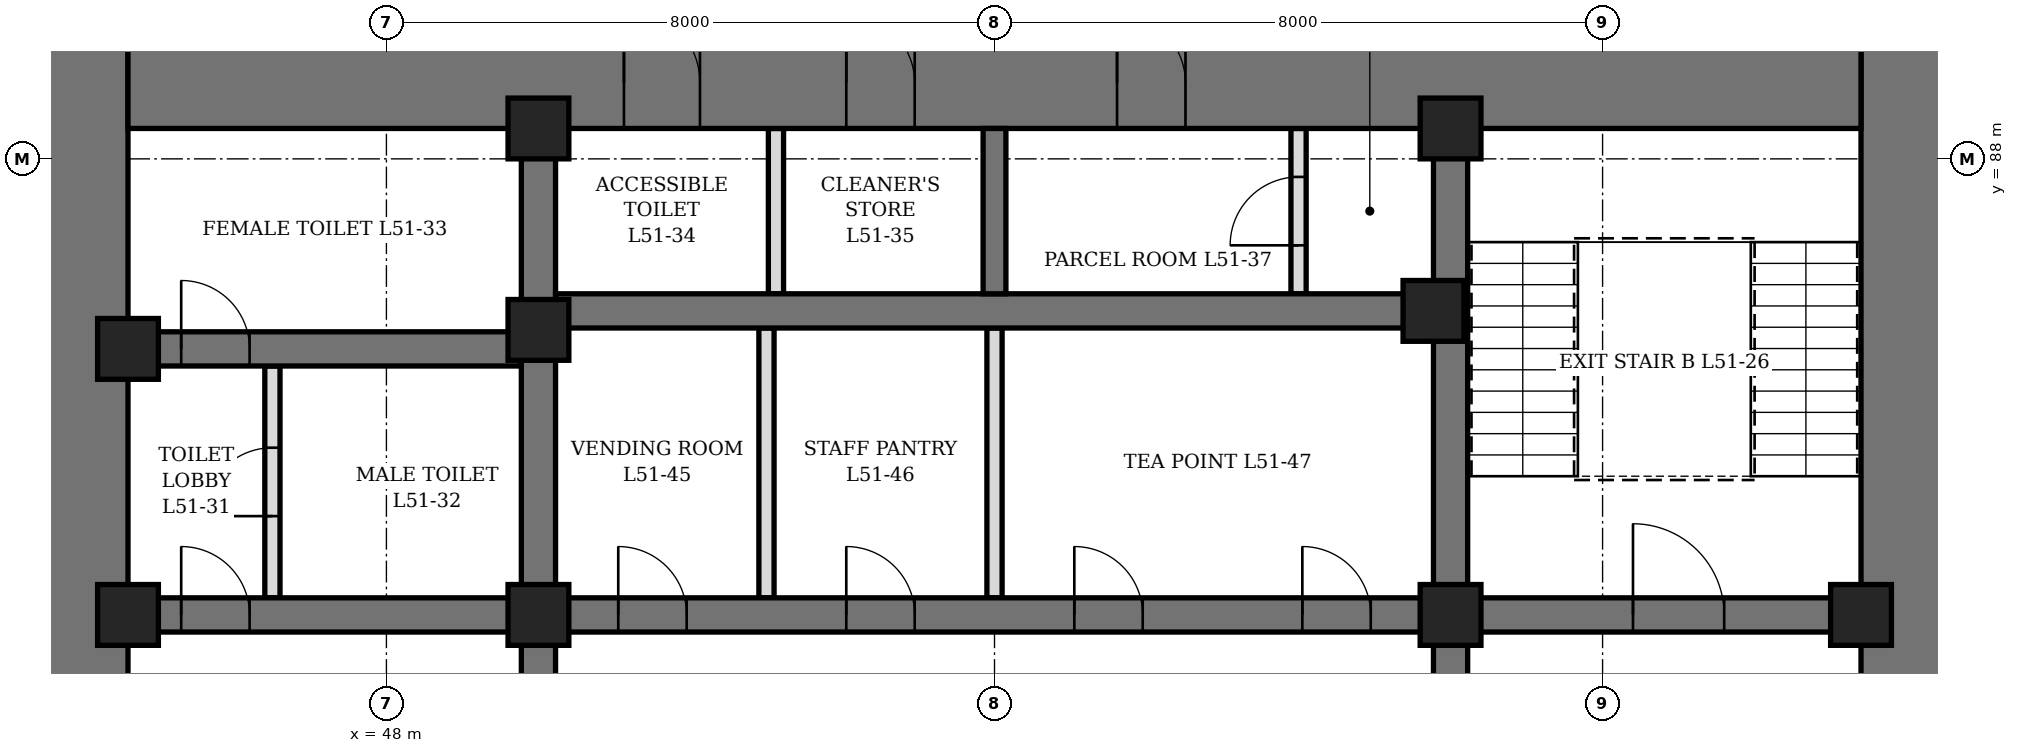
"""IFC4 building model, lengths in metres.
Left out: names, types, materials, properties, quantities, classifications, styles, units other than length and angle.
Written with IfcOpenShell. Run it as: python <this file> out.ifc"""

import sys

from ifc_helpers import new_model, si_unit, direction, frame, frame_2d, origin, origin_2d, place, context, subcontext, project, spatial, rectangle, hollow_rectangle, extrude, element, fill, save


model = new_model("IFC4")
c1 = context("Model", 3, precision=1e-05, world=origin(), true_north=direction((0.0, 1.0)))
c2 = subcontext(c1, "Body", "Model", "MODEL_VIEW")
j1 = project(units=[si_unit("LENGTHUNIT", "METRE"), si_unit("PLANEANGLEUNIT", "RADIAN")], contexts=[c1])
p1 = place(None, origin())
s1 = spatial("IfcSite", under=j1, at=p1, CompositionType="ELEMENT")
p2 = place(p1, origin())
s2 = spatial("IfcBuilding", under=s1, at=p2, CompositionType="ELEMENT")
p3 = place(p2, frame((0.0, 0.0, 227.5)))
s3 = spatial("IfcBuildingStorey", under=s2, at=p3, CompositionType="ELEMENT", Elevation=227.5)
p4 = place(p3, frame((44.0, 70.4, 0.0), z_axis=(0.0, 0.0, 1.0), x_axis=(0.0, 1.0, 0.0)))
e1 = element("IfcWall", 1, at=p4, inside=s3, PredefinedType="SHEAR", context=c2, shape_type="SweptSolid", body=[
    extrude(rectangle(XDim=19.2, YDim=1.2, at=frame_2d((9.6, 0.0))), origin(), (0.0, 0.0, 1.0), 4.2),
])
p5 = place(p4, frame((8.6, 0.0, 0.0)))
e2 = element("IfcOpeningElement", 2, at=p5, cuts=e1, PredefinedType="OPENING", context=c2, shape_type="SweptSolid", body=[
    extrude(rectangle(XDim=2.0, YDim=2.4, at=frame_2d((1.0, 1.2))), frame((0.0, 0.61, 0.0), z_axis=(0.0, -1.0, 0.0), x_axis=(1.0, 0.0, 0.0)), (0.0, 0.0, 1.0), 1.22),
])
p6 = place(p3, frame((68.0, 70.4, 0.0), z_axis=(0.0, 0.0, 1.0), x_axis=(0.0, 1.0, 0.0)))
e3 = element("IfcWall", 3, at=p6, inside=s3, PredefinedType="SHEAR", context=c2, shape_type="SweptSolid", body=[
    extrude(rectangle(XDim=19.2, YDim=1.2, at=frame_2d((9.6, 0.0))), origin(), (0.0, 0.0, 1.0), 4.2),
])
p7 = place(p6, frame((8.6, 0.0, 0.0)))
e4 = element("IfcOpeningElement", 4, at=p7, cuts=e3, PredefinedType="OPENING", context=c2, shape_type="SweptSolid", body=[
    extrude(rectangle(XDim=2.0, YDim=2.4, at=frame_2d((1.0, 1.2))), frame((0.0, 0.61, 0.0), z_axis=(0.0, -1.0, 0.0), x_axis=(1.0, 0.0, 0.0)), (0.0, 0.0, 1.0), 1.22),
])
p8 = place(p3, frame((44.6, 89.0, 0.0), z_axis=(0.0, 0.0, 1.0), x_axis=(1.0, 0.0, 0.0)))
e5 = element("IfcWall", 5, at=p8, inside=s3, PredefinedType="SHEAR", context=c2, shape_type="SweptSolid", body=[
    extrude(rectangle(XDim=22.8, YDim=1.2, at=frame_2d((11.4, 0.0))), origin(), (0.0, 0.0, 1.0), 4.2),
])
p9 = place(p8, frame((6.525, 0.0, 0.0)))
e6 = element("IfcOpeningElement", 6, at=p9, cuts=e5, PredefinedType="OPENING", context=c2, shape_type="SweptSolid", body=[
    extrude(rectangle(XDim=1.0, YDim=2.1, at=frame_2d((0.5, 1.05))), frame((0.0, 0.61, 0.0), z_axis=(0.0, -1.0, 0.0), x_axis=(1.0, 0.0, 0.0)), (0.0, 0.0, 1.0), 1.22),
])
p10 = place(p8, frame((9.45, 0.0, 0.0)))
e7 = element("IfcOpeningElement", 7, at=p10, cuts=e5, PredefinedType="OPENING", context=c2, shape_type="SweptSolid", body=[
    extrude(rectangle(XDim=0.9, YDim=2.1, at=frame_2d((0.45, 1.05))), frame((0.0, 0.61, 0.0), z_axis=(0.0, -1.0, 0.0), x_axis=(1.0, 0.0, 0.0)), (0.0, 0.0, 1.0), 1.22),
])
p11 = place(p8, frame((13.012, 0.0, 0.0)))
e8 = element("IfcOpeningElement", 8, at=p11, cuts=e5, PredefinedType="OPENING", context=c2, shape_type="SweptSolid", body=[
    extrude(rectangle(XDim=0.9, YDim=2.1, at=frame_2d((0.45, 1.05))), frame((0.0, 0.61, 0.0), z_axis=(0.0, -1.0, 0.0), x_axis=(1.0, 0.0, 0.0)), (0.0, 0.0, 1.0), 1.22),
])
p12 = place(p3, frame((50.0, 71.6, 0.0), z_axis=(0.0, 0.0, 1.0), x_axis=(0.0, 1.0, 0.0)))
e9 = element("IfcWall", 9, at=p12, inside=s3, PredefinedType="SHEAR", context=c2, shape_type="SweptSolid", body=[
    extrude(rectangle(XDim=16.8, YDim=0.45, at=frame_2d((8.4, 0.0))), origin(), (0.0, 0.0, 1.0), 4.2),
])
p13 = place(p12, frame((7.5, 0.0, 0.0)))
e10 = element("IfcOpeningElement", 10, at=p13, cuts=e9, PredefinedType="OPENING", context=c2, shape_type="SweptSolid", body=[
    extrude(rectangle(XDim=1.8, YDim=2.4, at=frame_2d((0.9, 1.2))), frame((0.0, 0.235, 0.0), z_axis=(0.0, -1.0, 0.0), x_axis=(1.0, 0.0, 0.0)), (0.0, 0.0, 1.0), 0.47),
])
p14 = place(p3, frame((62.0, 71.6, 0.0), z_axis=(0.0, 0.0, 1.0), x_axis=(0.0, 1.0, 0.0)))
e11 = element("IfcWall", 11, at=p14, inside=s3, PredefinedType="SHEAR", context=c2, shape_type="SweptSolid", body=[
    extrude(rectangle(XDim=16.8, YDim=0.45, at=frame_2d((8.4, 0.0))), origin(), (0.0, 0.0, 1.0), 4.2),
])
p15 = place(p14, frame((7.5, 0.0, 0.0)))
e12 = element("IfcOpeningElement", 12, at=p15, cuts=e11, PredefinedType="OPENING", context=c2, shape_type="SweptSolid", body=[
    extrude(rectangle(XDim=1.8, YDim=2.4, at=frame_2d((0.9, 1.2))), frame((0.0, 0.235, 0.0), z_axis=(0.0, -1.0, 0.0), x_axis=(1.0, 0.0, 0.0)), (0.0, 0.0, 1.0), 0.47),
])
p16 = place(p3, frame((44.6, 82.0, 0.0), z_axis=(0.0, 0.0, 1.0), x_axis=(1.0, 0.0, 0.0)))
e13 = element("IfcWall", 13, at=p16, inside=s3, PredefinedType="SHEAR", context=c2, shape_type="SweptSolid", body=[
    extrude(rectangle(XDim=5.175, YDim=0.45, at=frame_2d((2.587, 0.0))), origin(), (0.0, 0.0, 1.0), 4.2),
])
p17 = place(p16, frame((0.7, 0.0, 0.0)))
e14 = element("IfcOpeningElement", 14, at=p17, cuts=e13, PredefinedType="OPENING", context=c2, shape_type="SweptSolid", body=[
    extrude(rectangle(XDim=0.9, YDim=2.1, at=frame_2d((0.45, 1.05))), frame((0.0, 0.235, 0.0), z_axis=(0.0, -1.0, 0.0), x_axis=(1.0, 0.0, 0.0)), (0.0, 0.0, 1.0), 0.47),
])
p18 = place(p3, frame((44.6, 85.5, 0.0), z_axis=(0.0, 0.0, 1.0), x_axis=(1.0, 0.0, 0.0)))
e15 = element("IfcWall", 15, at=p18, inside=s3, PredefinedType="SHEAR", context=c2, shape_type="SweptSolid", body=[
    extrude(rectangle(XDim=5.175, YDim=0.45, at=frame_2d((2.587, 0.0))), origin(), (0.0, 0.0, 1.0), 4.2),
])
p19 = place(p18, frame((0.7, 0.0, 0.0)))
e16 = element("IfcOpeningElement", 16, at=p19, cuts=e15, PredefinedType="OPENING", context=c2, shape_type="SweptSolid", body=[
    extrude(rectangle(XDim=0.9, YDim=2.1, at=frame_2d((0.45, 1.05))), frame((0.0, 0.235, 0.0), z_axis=(0.0, -1.0, 0.0), x_axis=(1.0, 0.0, 0.0)), (0.0, 0.0, 1.0), 0.47),
])
p20 = place(p3, frame((62.225, 82.0, 0.0), z_axis=(0.0, 0.0, 1.0), x_axis=(1.0, 0.0, 0.0)))
e17 = element("IfcWall", 17, at=p20, inside=s3, PredefinedType="SHEAR", context=c2, shape_type="SweptSolid", body=[
    extrude(rectangle(XDim=5.175, YDim=0.45, at=frame_2d((2.587, 0.0))), origin(), (0.0, 0.0, 1.0), 4.2),
])
p21 = place(p20, frame((2.175, 0.0, 0.0)))
e18 = element("IfcOpeningElement", 18, at=p21, cuts=e17, PredefinedType="OPENING", context=c2, shape_type="SweptSolid", body=[
    extrude(rectangle(XDim=1.2, YDim=2.1, at=frame_2d((0.6, 1.05))), frame((0.0, 0.235, 0.0), z_axis=(0.0, -1.0, 0.0), x_axis=(1.0, 0.0, 0.0)), (0.0, 0.0, 1.0), 0.47),
])
p22 = place(p3, frame((50.225, 82.0, 0.0), z_axis=(0.0, 0.0, 1.0), x_axis=(1.0, 0.0, 0.0)))
e19 = element("IfcWall", 19, at=p22, inside=s3, PredefinedType="SHEAR", context=c2, shape_type="SweptSolid", body=[
    extrude(rectangle(XDim=11.55, YDim=0.45, at=frame_2d((5.775, 0.0))), origin(), (0.0, 0.0, 1.0), 4.2),
])
p23 = place(p22, frame((0.825, 0.0, 0.0)))
e20 = element("IfcOpeningElement", 20, at=p23, cuts=e19, PredefinedType="OPENING", context=c2, shape_type="SweptSolid", body=[
    extrude(rectangle(XDim=0.9, YDim=2.1, at=frame_2d((0.45, 1.05))), frame((0.0, 0.235, 0.0), z_axis=(0.0, -1.0, 0.0), x_axis=(1.0, 0.0, 0.0)), (0.0, 0.0, 1.0), 0.47),
])
p24 = place(p22, frame((3.825, 0.0, 0.0)))
e21 = element("IfcOpeningElement", 21, at=p24, cuts=e19, PredefinedType="OPENING", context=c2, shape_type="SweptSolid", body=[
    extrude(rectangle(XDim=0.9, YDim=2.1, at=frame_2d((0.45, 1.05))), frame((0.0, 0.235, 0.0), z_axis=(0.0, -1.0, 0.0), x_axis=(1.0, 0.0, 0.0)), (0.0, 0.0, 1.0), 0.47),
])
p25 = place(p22, frame((6.825, 0.0, 0.0)))
e22 = element("IfcOpeningElement", 22, at=p25, cuts=e19, PredefinedType="OPENING", context=c2, shape_type="SweptSolid", body=[
    extrude(rectangle(XDim=0.9, YDim=2.1, at=frame_2d((0.45, 1.05))), frame((0.0, 0.235, 0.0), z_axis=(0.0, -1.0, 0.0), x_axis=(1.0, 0.0, 0.0)), (0.0, 0.0, 1.0), 0.47),
])
p26 = place(p22, frame((9.825, 0.0, 0.0)))
e23 = element("IfcOpeningElement", 23, at=p26, cuts=e19, PredefinedType="OPENING", context=c2, shape_type="SweptSolid", body=[
    extrude(rectangle(XDim=0.9, YDim=2.1, at=frame_2d((0.45, 1.05))), frame((0.0, 0.235, 0.0), z_axis=(0.0, -1.0, 0.0), x_axis=(1.0, 0.0, 0.0)), (0.0, 0.0, 1.0), 0.47),
])
p27 = place(p3, frame((50.225, 86.0, 0.0), z_axis=(0.0, 0.0, 1.0), x_axis=(1.0, 0.0, 0.0)))
e24 = element("IfcWall", 24, at=p27, inside=s3, PredefinedType="SHEAR", context=c2, shape_type="SweptSolid", body=[
    extrude(rectangle(XDim=11.55, YDim=0.45, at=frame_2d((5.775, 0.0))), origin(), (0.0, 0.0, 1.0), 4.2),
])
p28 = place(p3, frame((56.0, 86.225, 0.0), z_axis=(0.0, 0.0, 1.0), x_axis=(0.0, 1.0, 0.0)))
e25 = element("IfcWall", 25, at=p28, inside=s3, PredefinedType="SHEAR", context=c2, shape_type="SweptSolid", body=[
    extrude(rectangle(XDim=2.175, YDim=0.3, at=frame_2d((1.087, 0.0))), origin(), (0.0, 0.0, 1.0), 4.2),
])
for number, where, z_axis, x_axis in (
    (26, (44.6, 82.0, 0.0), (0.0, 0.0, 1.0), (1.0, 0.0, 0.0)),
    (27, (44.6, 85.5, 0.0), (0.0, 0.0, 1.0), (1.0, 0.0, 0.0)),
    (28, (50.0, 82.0, 0.0), (0.0, 0.0, 1.0), (1.0, 0.0, 0.0)),
    (29, (50.0, 85.75, 0.0), (0.0, 0.0, 1.0), (1.0, 0.0, 0.0)),
    (30, (50.0, 88.4, 0.0), (0.0, 0.0, 1.0), (1.0, 0.0, 0.0)),
    (31, (61.775, 86.0, 0.0), (0.0, 0.0, 1.0), (1.0, 0.0, 0.0)),
    (32, (62.0, 82.0, 0.0), (0.0, 0.0, 1.0), (1.0, 0.0, 0.0)),
    (33, (62.0, 88.4, 0.0), (0.0, 0.0, 1.0), (1.0, 0.0, 0.0)),
    (34, (67.4, 82.0, 0.0), (0.0, 0.0, 1.0), (1.0, 0.0, 0.0)),
):
    element("IfcColumn", number, at=place(p3, frame(where, z_axis=z_axis, x_axis=x_axis)), inside=s3, PredefinedType="COLUMN", context=c2, shape_type="SweptSolid", body=[
        extrude(hollow_rectangle(XDim=0.8, YDim=0.8, WallThickness=0.1, at=origin_2d()), origin(), (0.0, 0.0, 1.0), 4.2),
    ])
p29 = place(p3, frame((46.5, 82.225, 0.0), z_axis=(0.0, 0.0, 1.0), x_axis=(0.0, 1.0, 0.0)))
e35 = element("IfcWall", 35, at=p29, inside=s3, PredefinedType="PARTITIONING", context=c2, shape_type="SweptSolid", body=[
    extrude(rectangle(XDim=3.05, YDim=0.2, at=frame_2d((1.525, 0.0))), origin(), (0.0, 0.0, 1.0), 4.04),
])
p30 = place(p29, frame((1.075, 0.0, 0.0)))
e36 = element("IfcOpeningElement", 36, at=p30, cuts=e35, PredefinedType="OPENING", context=c2, shape_type="SweptSolid", body=[
    extrude(rectangle(XDim=0.9, YDim=2.1, at=frame_2d((0.45, 1.05))), frame((0.0, 0.11, 0.0), z_axis=(0.0, -1.0, 0.0), x_axis=(1.0, 0.0, 0.0)), (0.0, 0.0, 1.0), 0.22),
])
p31 = place(p3, frame((53.125, 86.225, 0.0), z_axis=(0.0, 0.0, 1.0), x_axis=(0.0, 1.0, 0.0)))
e37 = element("IfcWall", 37, at=p31, inside=s3, PredefinedType="PARTITIONING", context=c2, shape_type="SweptSolid", body=[
    extrude(rectangle(XDim=2.175, YDim=0.2, at=frame_2d((1.087, 0.0))), origin(), (0.0, 0.0, 1.0), 4.04),
])
p32 = place(p3, frame((60.0, 86.225, 0.0), z_axis=(0.0, 0.0, 1.0), x_axis=(0.0, 1.0, 0.0)))
e38 = element("IfcWall", 38, at=p32, inside=s3, PredefinedType="PARTITIONING", context=c2, shape_type="SweptSolid", body=[
    extrude(rectangle(XDim=2.175, YDim=0.2, at=frame_2d((1.087, 0.0))), origin(), (0.0, 0.0, 1.0), 4.04),
])
p33 = place(p32, frame((0.637, 0.0, 0.0)))
e39 = element("IfcOpeningElement", 39, at=p33, cuts=e38, PredefinedType="OPENING", context=c2, shape_type="SweptSolid", body=[
    extrude(rectangle(XDim=0.9, YDim=2.1, at=frame_2d((0.45, 1.05))), frame((0.0, 0.11, 0.0), z_axis=(0.0, -1.0, 0.0), x_axis=(1.0, 0.0, 0.0)), (0.0, 0.0, 1.0), 0.22),
])
p34 = place(p3, frame((53.0, 82.225, 0.0), z_axis=(0.0, 0.0, 1.0), x_axis=(0.0, 1.0, 0.0)))
e40 = element("IfcWall", 40, at=p34, inside=s3, PredefinedType="PARTITIONING", context=c2, shape_type="SweptSolid", body=[
    extrude(rectangle(XDim=3.55, YDim=0.2, at=frame_2d((1.775, 0.0))), origin(), (0.0, 0.0, 1.0), 4.04),
])
p35 = place(p3, frame((56.0, 82.225, 0.0), z_axis=(0.0, 0.0, 1.0), x_axis=(0.0, 1.0, 0.0)))
e41 = element("IfcWall", 41, at=p35, inside=s3, PredefinedType="PARTITIONING", context=c2, shape_type="SweptSolid", body=[
    extrude(rectangle(XDim=3.55, YDim=0.2, at=frame_2d((1.775, 0.0))), origin(), (0.0, 0.0, 1.0), 3.14),
])
p36 = place(p17, origin())
e42 = element("IfcDoor", 42, at=p36, inside=s3, OperationType="SINGLE_SWING_LEFT", PredefinedType="DOOR", context=c2, shape_type="SweptSolid", body=[
    extrude(rectangle(XDim=0.9, YDim=2.1, at=frame_2d((0.45, 1.05))), frame((0.0, 0.225, 0.0), z_axis=(0.0, -1.0, 0.0), x_axis=(1.0, 0.0, 0.0)), (0.0, 0.0, 1.0), 0.449),
])
fill(e14, e42)
p37 = place(p30, origin())
e43 = element("IfcDoor", 43, at=p37, inside=s3, OperationType="SINGLE_SWING_RIGHT", PredefinedType="DOOR", context=c2, shape_type="SweptSolid", body=[
    extrude(rectangle(XDim=0.9, YDim=2.1, at=frame_2d((0.45, 1.05))), frame((0.0, 0.1, 0.0), z_axis=(0.0, -1.0, 0.0), x_axis=(1.0, 0.0, 0.0)), (0.0, 0.0, 1.0), 0.199),
])
fill(e36, e43)
p38 = place(p19, origin())
e44 = element("IfcDoor", 44, at=p38, inside=s3, OperationType="SINGLE_SWING_RIGHT", PredefinedType="DOOR", context=c2, shape_type="SweptSolid", body=[
    extrude(rectangle(XDim=0.9, YDim=2.1, at=frame_2d((0.45, 1.05))), frame((0.0, 0.225, 0.0), z_axis=(0.0, -1.0, 0.0), x_axis=(1.0, 0.0, 0.0)), (0.0, 0.0, 1.0), 0.449),
])
fill(e16, e44)
p39 = place(p9, origin())
e45 = element("IfcDoor", 45, at=p39, inside=s3, OperationType="SINGLE_SWING_LEFT", PredefinedType="DOOR", context=c2, shape_type="SweptSolid", body=[
    extrude(rectangle(XDim=1.0, YDim=2.1, at=frame_2d((0.5, 1.05))), frame((0.0, 0.35, 0.0), z_axis=(0.0, -1.0, 0.0), x_axis=(1.0, 0.0, 0.0)), (0.0, 0.0, 1.0), 0.7),
])
fill(e6, e45)
p40 = place(p10, origin())
e46 = element("IfcDoor", 46, at=p40, inside=s3, OperationType="SINGLE_SWING_LEFT", PredefinedType="DOOR", context=c2, shape_type="SweptSolid", body=[
    extrude(rectangle(XDim=0.9, YDim=2.1, at=frame_2d((0.45, 1.05))), frame((0.0, 0.35, 0.0), z_axis=(0.0, -1.0, 0.0), x_axis=(1.0, 0.0, 0.0)), (0.0, 0.0, 1.0), 0.7),
])
fill(e7, e46)
p41 = place(p11, origin())
e47 = element("IfcDoor", 47, at=p41, inside=s3, OperationType="SINGLE_SWING_LEFT", PredefinedType="DOOR", context=c2, shape_type="SweptSolid", body=[
    extrude(rectangle(XDim=0.9, YDim=2.1, at=frame_2d((0.45, 1.05))), frame((0.0, 0.35, 0.0), z_axis=(0.0, -1.0, 0.0), x_axis=(1.0, 0.0, 0.0)), (0.0, 0.0, 1.0), 0.7),
])
fill(e8, e47)
p42 = place(p33, origin())
e48 = element("IfcDoor", 48, at=p42, inside=s3, OperationType="SINGLE_SWING_LEFT", PredefinedType="DOOR", context=c2, shape_type="SweptSolid", body=[
    extrude(rectangle(XDim=0.9, YDim=2.1, at=frame_2d((0.45, 1.05))), frame((0.0, 0.1, 0.0), z_axis=(0.0, -1.0, 0.0), x_axis=(1.0, 0.0, 0.0)), (0.0, 0.0, 1.0), 0.199),
])
fill(e39, e48)
p43 = place(p23, origin())
e49 = element("IfcDoor", 49, at=p43, inside=s3, OperationType="SINGLE_SWING_LEFT", PredefinedType="DOOR", context=c2, shape_type="SweptSolid", body=[
    extrude(rectangle(XDim=0.9, YDim=2.1, at=frame_2d((0.45, 1.05))), frame((0.0, 0.225, 0.0), z_axis=(0.0, -1.0, 0.0), x_axis=(1.0, 0.0, 0.0)), (0.0, 0.0, 1.0), 0.449),
])
fill(e20, e49)
p44 = place(p24, origin())
e50 = element("IfcDoor", 50, at=p44, inside=s3, OperationType="SINGLE_SWING_LEFT", PredefinedType="DOOR", context=c2, shape_type="SweptSolid", body=[
    extrude(rectangle(XDim=0.9, YDim=2.1, at=frame_2d((0.45, 1.05))), frame((0.0, 0.225, 0.0), z_axis=(0.0, -1.0, 0.0), x_axis=(1.0, 0.0, 0.0)), (0.0, 0.0, 1.0), 0.449),
])
fill(e21, e50)
p45 = place(p25, origin())
e51 = element("IfcDoor", 51, at=p45, inside=s3, OperationType="SINGLE_SWING_LEFT", PredefinedType="DOOR", context=c2, shape_type="SweptSolid", body=[
    extrude(rectangle(XDim=0.9, YDim=2.1, at=frame_2d((0.45, 1.05))), frame((0.0, 0.225, 0.0), z_axis=(0.0, -1.0, 0.0), x_axis=(1.0, 0.0, 0.0)), (0.0, 0.0, 1.0), 0.449),
])
fill(e22, e51)
p46 = place(p26, origin())
e52 = element("IfcDoor", 52, at=p46, inside=s3, OperationType="SINGLE_SWING_LEFT", PredefinedType="DOOR", context=c2, shape_type="SweptSolid", body=[
    extrude(rectangle(XDim=0.9, YDim=2.1, at=frame_2d((0.45, 1.05))), frame((0.0, 0.225, 0.0), z_axis=(0.0, -1.0, 0.0), x_axis=(1.0, 0.0, 0.0)), (0.0, 0.0, 1.0), 0.449),
])
fill(e23, e52)
p47 = place(p21, origin())
e53 = element("IfcDoor", 53, at=p47, inside=s3, OperationType="SINGLE_SWING_LEFT", PredefinedType="DOOR", context=c2, shape_type="SweptSolid", body=[
    extrude(rectangle(XDim=1.2, YDim=2.1, at=frame_2d((0.6, 1.05))), frame((0.0, 0.225, 0.0), z_axis=(0.0, -1.0, 0.0), x_axis=(1.0, 0.0, 0.0)), (0.0, 0.0, 1.0), 0.449),
])
fill(e18, e53)
save(model, sys.argv[1])
